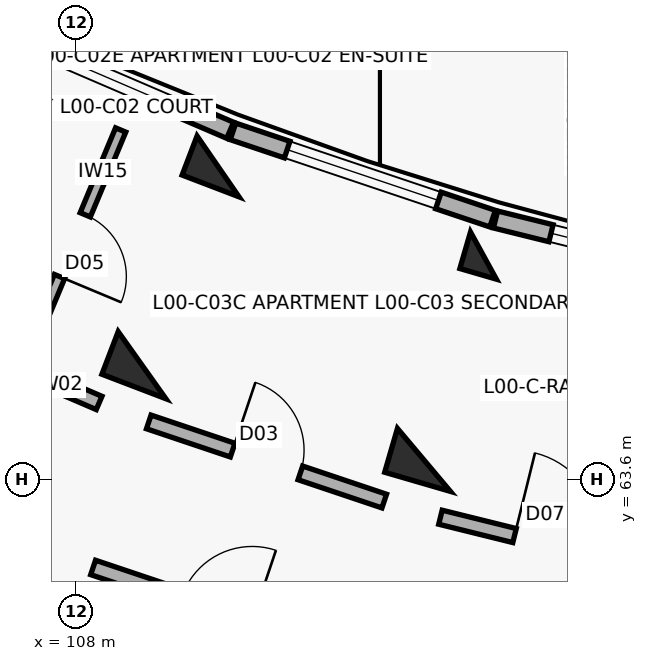
"""IFC4 building model, lengths in metres.
Left out: names, types, materials, properties, quantities, classifications, styles, units other than length and angle.
Written with IfcOpenShell. Run it as: python <this file> out.ifc"""

import sys

from ifc_helpers import new_model, si_unit, direction, frame, frame_2d, origin, origin_2d, place, context, subcontext, project, spatial, rectangle, extrude, element, fill, save


model = new_model("IFC4")
c1 = context("Model", 3, precision=1e-05, world=origin(), true_north=direction((0.0, 1.0)))
c2 = subcontext(c1, "Body", "Model", "MODEL_VIEW")
j1 = project(units=[si_unit("LENGTHUNIT", "METRE"), si_unit("PLANEANGLEUNIT", "RADIAN")], contexts=[c1])
p1 = place(None, origin())
s1 = spatial("IfcSite", under=j1, at=p1, CompositionType="ELEMENT")
p2 = place(p1, origin())
s2 = spatial("IfcBuilding", under=s1, at=p2, CompositionType="ELEMENT")
p3 = place(p2, origin())
s3 = spatial("IfcBuildingStorey", under=s2, at=p3, CompositionType="ELEMENT", Elevation=0.0)
p4 = place(p3, frame((109.869, 67.714, 0.0), z_axis=(0.0, 0.0, 1.0), x_axis=(-0.357064076459, -0.934079892355, 0.0)))
e1 = element("IfcColumn", 1, at=p4, inside=s3, PredefinedType="COLUMN", context=c2, shape_type="SweptSolid", body=[
    extrude(rectangle(XDim=0.55, YDim=0.8, at=origin_2d()), origin(), (0.0, 0.0, 1.0), 4.5),
])
p5 = place(p3, frame((108.869, 65.099, 0.0), z_axis=(0.0, 0.0, 1.0), x_axis=(-0.357064076459, -0.934079892355, 0.0)))
e2 = element("IfcColumn", 2, at=p5, inside=s3, PredefinedType="COLUMN", context=c2, shape_type="SweptSolid", body=[
    extrude(rectangle(XDim=0.6, YDim=0.9, at=origin_2d()), origin(), (0.0, 0.0, 1.0), 4.5),
])
p6 = place(p3, frame((113.362, 66.54, 0.0), z_axis=(0.0, 0.0, 1.0), x_axis=(-0.27966144946, -0.96009867914, 0.0)))
e3 = element("IfcColumn", 3, at=p6, inside=s3, PredefinedType="COLUMN", context=c2, shape_type="SweptSolid", body=[
    extrude(rectangle(XDim=0.5, YDim=0.5, at=origin_2d()), origin(), (0.0, 0.0, 1.0), 4.5),
])
p7 = place(p3, frame((112.579, 63.852, 0.0), z_axis=(0.0, 0.0, 1.0), x_axis=(-0.27966144946, -0.96009867914, 0.0)))
e4 = element("IfcColumn", 4, at=p7, inside=s3, PredefinedType="COLUMN", context=c2, shape_type="SweptSolid", body=[
    extrude(rectangle(XDim=0.6, YDim=0.9, at=origin_2d()), origin(), (0.0, 0.0, 1.0), 4.5),
])
p8 = place(p3, frame((106.719, 69.612, 0.0), z_axis=(0.0, 0.0, 1.0), x_axis=(0.918724004531, -0.394900244997, 0.0)))
e5 = element("IfcWall", 5, at=p8, inside=s3, PredefinedType="SOLIDWALL", context=c2, shape_type="SweptSolid", body=[
    extrude(rectangle(XDim=3.604, YDim=0.23, at=frame_2d((1.802, 0.0))), origin(), (0.0, 0.0, 1.0), 3.45),
])
p9 = place(p8, frame((0.752, 0.0, 0.32)))
e6 = element("IfcOpeningElement", 6, at=p9, cuts=e5, PredefinedType="OPENING", context=c2, shape_type="SweptSolid", body=[
    extrude(rectangle(XDim=2.1, YDim=1.65, at=frame_2d((1.05, 0.825))), frame((0.0, 0.125, 0.0), z_axis=(0.0, -1.0, 0.0), x_axis=(1.0, 0.0, 0.0)), (0.0, 0.0, 1.0), 0.25),
])
p10 = place(p3, frame((110.067, 68.175, 0.0), z_axis=(0.0, 0.0, 1.0), x_axis=(0.947887701822, -0.318604621332, 0.0)))
e7 = element("IfcWall", 7, at=p10, inside=s3, PredefinedType="SOLIDWALL", context=c2, shape_type="SweptSolid", body=[
    extrude(rectangle(XDim=3.604, YDim=0.23, at=frame_2d((1.802, 0.0))), origin(), (0.0, 0.0, 1.0), 3.45),
])
p11 = place(p10, frame((0.752, 0.0, 0.32)))
e8 = element("IfcOpeningElement", 8, at=p11, cuts=e7, PredefinedType="OPENING", context=c2, shape_type="SweptSolid", body=[
    extrude(rectangle(XDim=2.1, YDim=1.65, at=frame_2d((1.05, 0.825))), frame((0.0, 0.125, 0.0), z_axis=(0.0, -1.0, 0.0), x_axis=(1.0, 0.0, 0.0)), (0.0, 0.0, 1.0), 0.25),
])
p12 = place(p3, frame((113.521, 67.016, 0.0), z_axis=(0.0, 0.0, 1.0), x_axis=(0.970713661797, -0.240239436399, 0.0)))
e9 = element("IfcWall", 9, at=p12, inside=s3, PredefinedType="SOLIDWALL", context=c2, shape_type="SweptSolid", body=[
    extrude(rectangle(XDim=3.604, YDim=0.23, at=frame_2d((1.802, 0.0))), origin(), (0.0, 0.0, 1.0), 3.45),
])
p13 = place(p12, frame((0.752, 0.0, 0.32)))
e10 = element("IfcOpeningElement", 10, at=p13, cuts=e9, PredefinedType="OPENING", context=c2, shape_type="SweptSolid", body=[
    extrude(rectangle(XDim=2.1, YDim=1.65, at=frame_2d((1.05, 0.825))), frame((0.0, 0.125, 0.0), z_axis=(0.0, -1.0, 0.0), x_axis=(1.0, 0.0, 0.0)), (0.0, 0.0, 1.0), 0.25),
])
p14 = place(p3, frame((105.302, 65.893, 0.0), z_axis=(0.0, 0.0, 1.0), x_axis=(0.918723391052, -0.394901672235, 0.0)))
e11 = element("IfcWall", 11, at=p14, inside=s3, PredefinedType="SOLIDWALL", context=c2, shape_type="SweptSolid", body=[
    extrude(rectangle(XDim=3.269, YDim=0.19, at=frame_2d((1.634, 0.0))), origin(), (0.0, 0.0, 1.0), 3.34),
])
p15 = place(p14, frame((1.174, 0.0, 0.0)))
e12 = element("IfcOpeningElement", 12, at=p15, cuts=e11, PredefinedType="OPENING", context=c2, shape_type="SweptSolid", body=[
    extrude(rectangle(XDim=0.92, YDim=2.1, at=frame_2d((0.46, 1.05))), frame((0.0, 0.105, 0.0), z_axis=(0.0, -1.0, 0.0), x_axis=(1.0, 0.0, 0.0)), (0.0, 0.0, 1.0), 0.21),
])
p16 = place(p3, frame((108.589, 68.194, 0.0), z_axis=(0.0, 0.0, 1.0), x_axis=(-0.385151143297, -0.922853507777, 0.0)))
e13 = element("IfcWall", 13, at=p16, inside=s3, PredefinedType="PARTITIONING", context=c2, shape_type="SweptSolid", body=[
    extrude(rectangle(XDim=3.3, YDim=0.145, at=frame_2d((1.65, 0.0))), origin(), (0.0, 0.0, 1.0), 3.34),
])
p17 = place(p16, frame((1.21, 0.0, 0.0)))
e14 = element("IfcOpeningElement", 14, at=p17, cuts=e13, PredefinedType="OPENING", context=c2, shape_type="SweptSolid", body=[
    extrude(rectangle(XDim=0.88, YDim=2.1, at=frame_2d((0.44, 1.05))), frame((0.0, 0.083, 0.0), z_axis=(0.0, -1.0, 0.0), x_axis=(1.0, 0.0, 0.0)), (0.0, 0.0, 1.0), 0.165),
])
p18 = place(p3, frame((108.227, 62.437, 0.0), z_axis=(0.0, 0.0, 1.0), x_axis=(0.947884468821, -0.318614239745, 0.0)))
e15 = element("IfcWall", 15, at=p18, inside=s3, PredefinedType="SOLIDWALL", context=c2, shape_type="SweptSolid", body=[
    extrude(rectangle(XDim=3.436, YDim=0.2, at=frame_2d((1.718, 0.0))), origin(), (0.0, 0.0, 1.0), 3.34),
])
p19 = place(p18, frame((1.228, 0.0, 0.0)))
e16 = element("IfcOpeningElement", 16, at=p19, cuts=e15, PredefinedType="OPENING", context=c2, shape_type="SweptSolid", body=[
    extrude(rectangle(XDim=0.98, YDim=2.15, at=frame_2d((0.49, 1.075))), frame((0.0, 0.11, 0.0), z_axis=(0.0, -1.0, 0.0), x_axis=(1.0, 0.0, 0.0)), (0.0, 0.0, 1.0), 0.22),
])
p20 = place(p3, frame((108.958, 64.352, 0.0), z_axis=(0.0, 0.0, 1.0), x_axis=(0.94787351033, -0.318646839643, 0.0)))
e17 = element("IfcWall", 17, at=p20, inside=s3, PredefinedType="SOLIDWALL", context=c2, shape_type="SweptSolid", body=[
    extrude(rectangle(XDim=3.269, YDim=0.19, at=frame_2d((1.634, 0.0))), origin(), (0.0, 0.0, 1.0), 3.34),
])
p21 = place(p20, frame((1.164, 0.0, 0.0)))
e18 = element("IfcOpeningElement", 18, at=p21, cuts=e17, PredefinedType="OPENING", context=c2, shape_type="SweptSolid", body=[
    extrude(rectangle(XDim=0.94, YDim=2.1, at=frame_2d((0.47, 1.05))), frame((0.0, 0.105, 0.0), z_axis=(0.0, -1.0, 0.0), x_axis=(1.0, 0.0, 0.0)), (0.0, 0.0, 1.0), 0.21),
])
p22 = place(p3, frame((112.796, 63.098, 0.0), z_axis=(0.0, 0.0, 1.0), x_axis=(0.970708998014, -0.240258280136, 0.0)))
e19 = element("IfcWall", 19, at=p22, inside=s3, PredefinedType="SOLIDWALL", context=c2, shape_type="SweptSolid", body=[
    extrude(rectangle(XDim=3.129, YDim=0.19, at=frame_2d((1.564, 0.0))), origin(), (0.0, 0.0, 1.0), 3.34),
])
p23 = place(p22, frame((1.004, 0.0, 0.0)))
e20 = element("IfcOpeningElement", 20, at=p23, cuts=e19, PredefinedType="OPENING", context=c2, shape_type="SweptSolid", body=[
    extrude(rectangle(XDim=1.12, YDim=2.15, at=frame_2d((0.56, 1.075))), frame((0.0, 0.105, 0.0), z_axis=(0.0, -1.0, 0.0), x_axis=(1.0, 0.0, 0.0)), (0.0, 0.0, 1.0), 0.21),
])
p24 = place(p9, origin())
e21 = element("IfcWindow", 21, at=p24, inside=s3, PartitioningType="TRIPLE_PANEL_VERTICAL", PredefinedType="WINDOW", context=c2, shape_type="SweptSolid", body=[
    extrude(rectangle(XDim=2.1, YDim=1.65, at=frame_2d((1.05, 0.825))), frame((0.0, 0.03, 0.0), z_axis=(0.0, -1.0, 0.0), x_axis=(1.0, 0.0, 0.0)), (0.0, 0.0, 1.0), 0.06),
])
fill(e6, e21)
p25 = place(p11, origin())
e22 = element("IfcWindow", 22, at=p25, inside=s3, PartitioningType="TRIPLE_PANEL_VERTICAL", PredefinedType="WINDOW", context=c2, shape_type="SweptSolid", body=[
    extrude(rectangle(XDim=2.1, YDim=1.65, at=frame_2d((1.05, 0.825))), frame((0.0, 0.03, 0.0), z_axis=(0.0, -1.0, 0.0), x_axis=(1.0, 0.0, 0.0)), (0.0, 0.0, 1.0), 0.06),
])
fill(e8, e22)
p26 = place(p13, origin())
e23 = element("IfcWindow", 23, at=p26, inside=s3, PartitioningType="TRIPLE_PANEL_VERTICAL", PredefinedType="WINDOW", context=c2, shape_type="SweptSolid", body=[
    extrude(rectangle(XDim=2.1, YDim=1.65, at=frame_2d((1.05, 0.825))), frame((0.0, 0.03, 0.0), z_axis=(0.0, -1.0, 0.0), x_axis=(1.0, 0.0, 0.0)), (0.0, 0.0, 1.0), 0.06),
])
fill(e10, e23)
p27 = place(p17, origin())
e24 = element("IfcDoor", 24, at=p27, inside=s3, OperationType="SINGLE_SWING_RIGHT", PredefinedType="DOOR", context=c2, shape_type="SweptSolid", body=[
    extrude(rectangle(XDim=0.88, YDim=2.1, at=frame_2d((0.44, 1.05))), frame((0.0, 0.025, 0.0), z_axis=(0.0, -1.0, 0.0), x_axis=(1.0, 0.0, 0.0)), (0.0, 0.0, 1.0), 0.05),
])
fill(e14, e24)
p28 = place(p21, origin())
e25 = element("IfcDoor", 25, at=p28, inside=s3, OperationType="SINGLE_SWING_LEFT", PredefinedType="DOOR", context=c2, shape_type="SweptSolid", body=[
    extrude(rectangle(XDim=0.94, YDim=2.1, at=frame_2d((0.47, 1.05))), frame((0.0, 0.025, 0.0), z_axis=(0.0, -1.0, 0.0), x_axis=(1.0, 0.0, 0.0)), (0.0, 0.0, 1.0), 0.05),
])
fill(e18, e25)
p29 = place(p23, origin())
e26 = element("IfcDoor", 26, at=p29, inside=s3, OperationType="SINGLE_SWING_LEFT", PredefinedType="DOOR", context=c2, shape_type="SweptSolid", body=[
    extrude(rectangle(XDim=1.12, YDim=2.15, at=frame_2d((0.56, 1.075))), frame((0.0, 0.025, 0.0), z_axis=(0.0, -1.0, 0.0), x_axis=(1.0, 0.0, 0.0)), (0.0, 0.0, 1.0), 0.05),
])
fill(e20, e26)
save(model, sys.argv[1])
